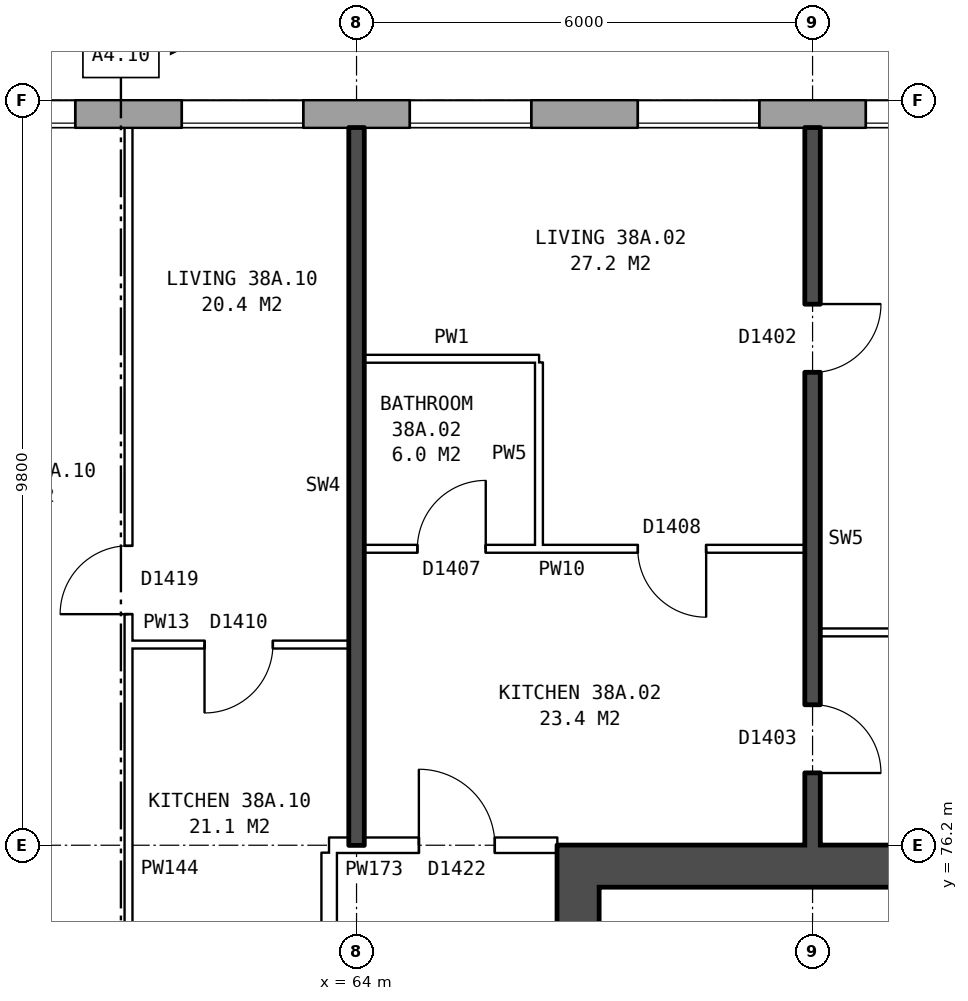
"""IFC4 building model, lengths in metres.
Left out: names, types, materials, properties, quantities, classifications, styles, units other than length and angle.
Written with IfcOpenShell. Run it as: python <this file> out.ifc"""

import sys

from ifc_helpers import new_model, si_unit, direction, frame, frame_2d, origin, place, context, subcontext, project, spatial, rectangle, extrude, element, fill, save


model = new_model("IFC4")
c1 = context("Model", 3, precision=1e-05, world=origin(), true_north=direction((0.0, 1.0)))
c2 = subcontext(c1, "Body", "Model", "MODEL_VIEW")
j1 = project(units=[si_unit("LENGTHUNIT", "METRE"), si_unit("PLANEANGLEUNIT", "RADIAN")], contexts=[c1])
p1 = place(None, origin())
s1 = spatial("IfcSite", under=j1, at=p1, CompositionType="ELEMENT")
p2 = place(p1, origin())
s2 = spatial("IfcBuilding", under=s1, at=p2, CompositionType="ELEMENT")
p3 = place(p2, frame((0.0, 0.0, 136.1)))
s3 = spatial("IfcBuildingStorey", under=s2, at=p3, CompositionType="ELEMENT", Elevation=136.1)
p4 = place(p3, frame((72.925, 85.82, 0.0), z_axis=(0.0, 0.0, 1.0), x_axis=(-1.0, 0.0, 0.0)))
e1 = element("IfcWall", 1, at=p4, inside=s3, PredefinedType="STANDARD", context=c2, shape_type="SweptSolid", body=[
    extrude(rectangle(XDim=43.101, YDim=0.36, at=frame_2d((21.55, 0.0))), origin(), (0.0, 0.0, 1.0), 2.85),
])
p5 = place(p4, frame((0.625, 0.0, 0.8)))
e2 = element("IfcOpeningElement", 2, at=p5, cuts=e1, PredefinedType="OPENING", context=c2, shape_type="SweptSolid", body=[
    extrude(rectangle(XDim=1.6, YDim=1.8, at=frame_2d((0.8, 0.9))), frame((0.0, 0.19, 0.0), z_axis=(0.0, -1.0, 0.0), x_axis=(1.0, 0.0, 0.0)), (0.0, 0.0, 1.0), 0.38),
])
p6 = place(p4, frame((3.625, 0.0, 0.8)))
e3 = element("IfcOpeningElement", 3, at=p6, cuts=e1, PredefinedType="OPENING", context=c2, shape_type="SweptSolid", body=[
    extrude(rectangle(XDim=1.6, YDim=1.8, at=frame_2d((0.8, 0.9))), frame((0.0, 0.19, 0.0), z_axis=(0.0, -1.0, 0.0), x_axis=(1.0, 0.0, 0.0)), (0.0, 0.0, 1.0), 0.38),
])
p7 = place(p4, frame((6.625, 0.0, 0.8)))
e4 = element("IfcOpeningElement", 4, at=p7, cuts=e1, PredefinedType="OPENING", context=c2, shape_type="SweptSolid", body=[
    extrude(rectangle(XDim=1.6, YDim=1.8, at=frame_2d((0.8, 0.9))), frame((0.0, 0.19, 0.0), z_axis=(0.0, -1.0, 0.0), x_axis=(1.0, 0.0, 0.0)), (0.0, 0.0, 1.0), 0.38),
])
p8 = place(p4, frame((9.625, 0.0, 0.8)))
e5 = element("IfcOpeningElement", 5, at=p8, cuts=e1, PredefinedType="OPENING", context=c2, shape_type="SweptSolid", body=[
    extrude(rectangle(XDim=1.6, YDim=1.8, at=frame_2d((0.8, 0.9))), frame((0.0, 0.19, 0.0), z_axis=(0.0, -1.0, 0.0), x_axis=(1.0, 0.0, 0.0)), (0.0, 0.0, 1.0), 0.38),
])
p9 = place(p4, frame((12.625, 0.0, 0.8)))
e6 = element("IfcOpeningElement", 6, at=p9, cuts=e1, PredefinedType="OPENING", context=c2, shape_type="SweptSolid", body=[
    extrude(rectangle(XDim=1.6, YDim=1.8, at=frame_2d((0.8, 0.9))), frame((0.0, 0.19, 0.0), z_axis=(0.0, -1.0, 0.0), x_axis=(1.0, 0.0, 0.0)), (0.0, 0.0, 1.0), 0.38),
])
p10 = place(p4, frame((15.125, 0.0, 1.35)))
e7 = element("IfcOpeningElement", 7, at=p10, cuts=e1, PredefinedType="OPENING", context=c2, shape_type="SweptSolid", body=[
    extrude(rectangle(XDim=1.0, YDim=1.2, at=frame_2d((0.5, 0.6))), frame((0.0, 0.19, 0.0), z_axis=(0.0, -1.0, 0.0), x_axis=(1.0, 0.0, 0.0)), (0.0, 0.0, 1.0), 0.38),
])
p11 = place(p4, frame((18.625, 0.0, 0.8)))
e8 = element("IfcOpeningElement", 8, at=p11, cuts=e1, PredefinedType="OPENING", context=c2, shape_type="SweptSolid", body=[
    extrude(rectangle(XDim=1.6, YDim=1.8, at=frame_2d((0.8, 0.9))), frame((0.0, 0.19, 0.0), z_axis=(0.0, -1.0, 0.0), x_axis=(1.0, 0.0, 0.0)), (0.0, 0.0, 1.0), 0.38),
])
p12 = place(p4, frame((21.625, 0.0, 0.8)))
e9 = element("IfcOpeningElement", 9, at=p12, cuts=e1, PredefinedType="OPENING", context=c2, shape_type="SweptSolid", body=[
    extrude(rectangle(XDim=1.6, YDim=1.8, at=frame_2d((0.8, 0.9))), frame((0.0, 0.19, 0.0), z_axis=(0.0, -1.0, 0.0), x_axis=(1.0, 0.0, 0.0)), (0.0, 0.0, 1.0), 0.38),
])
p13 = place(p4, frame((24.075, 0.0, 0.35)))
e10 = element("IfcOpeningElement", 10, at=p13, cuts=e1, PredefinedType="OPENING", context=c2, shape_type="SweptSolid", body=[
    extrude(rectangle(XDim=0.8, YDim=1.8, at=frame_2d((0.4, 0.9))), frame((0.0, 0.19, 0.0), z_axis=(0.0, -1.0, 0.0), x_axis=(1.0, 0.0, 0.0)), (0.0, 0.0, 1.0), 0.38),
])
p14 = place(p4, frame((27.625, 0.0, 0.8)))
e11 = element("IfcOpeningElement", 11, at=p14, cuts=e1, PredefinedType="OPENING", context=c2, shape_type="SweptSolid", body=[
    extrude(rectangle(XDim=1.6, YDim=1.8, at=frame_2d((0.8, 0.9))), frame((0.0, 0.19, 0.0), z_axis=(0.0, -1.0, 0.0), x_axis=(1.0, 0.0, 0.0)), (0.0, 0.0, 1.0), 0.38),
])
p15 = place(p4, frame((30.625, 0.0, 0.8)))
e12 = element("IfcOpeningElement", 12, at=p15, cuts=e1, PredefinedType="OPENING", context=c2, shape_type="SweptSolid", body=[
    extrude(rectangle(XDim=1.6, YDim=1.8, at=frame_2d((0.8, 0.9))), frame((0.0, 0.19, 0.0), z_axis=(0.0, -1.0, 0.0), x_axis=(1.0, 0.0, 0.0)), (0.0, 0.0, 1.0), 0.38),
])
p16 = place(p4, frame((33.625, 0.0, 0.8)))
e13 = element("IfcOpeningElement", 13, at=p16, cuts=e1, PredefinedType="OPENING", context=c2, shape_type="SweptSolid", body=[
    extrude(rectangle(XDim=1.6, YDim=1.8, at=frame_2d((0.8, 0.9))), frame((0.0, 0.19, 0.0), z_axis=(0.0, -1.0, 0.0), x_axis=(1.0, 0.0, 0.0)), (0.0, 0.0, 1.0), 0.38),
])
p17 = place(p4, frame((36.625, 0.0, 0.8)))
e14 = element("IfcOpeningElement", 14, at=p17, cuts=e1, PredefinedType="OPENING", context=c2, shape_type="SweptSolid", body=[
    extrude(rectangle(XDim=1.6, YDim=1.8, at=frame_2d((0.8, 0.9))), frame((0.0, 0.19, 0.0), z_axis=(0.0, -1.0, 0.0), x_axis=(1.0, 0.0, 0.0)), (0.0, 0.0, 1.0), 0.38),
])
p18 = place(p4, frame((39.625, 0.0, 0.8)))
e15 = element("IfcOpeningElement", 15, at=p18, cuts=e1, PredefinedType="OPENING", context=c2, shape_type="SweptSolid", body=[
    extrude(rectangle(XDim=1.6, YDim=1.8, at=frame_2d((0.8, 0.9))), frame((0.0, 0.19, 0.0), z_axis=(0.0, -1.0, 0.0), x_axis=(1.0, 0.0, 0.0)), (0.0, 0.0, 1.0), 0.38),
])
p19 = place(p4, frame((16.975, 0.0, 0.15)))
e16 = element("IfcOpeningElement", 16, at=p19, cuts=e1, PredefinedType="OPENING", context=c2, shape_type="SweptSolid", body=[
    extrude(rectangle(XDim=0.8, YDim=0.9, at=frame_2d((0.4, 0.45))), frame((0.0, 0.19, 0.0), z_axis=(0.0, -1.0, 0.0), x_axis=(1.0, 0.0, 0.0)), (0.0, 0.0, 1.0), 0.38),
])
p20 = place(p4, frame((25.175, 0.0, 0.25)))
e17 = element("IfcOpeningElement", 17, at=p20, cuts=e1, PredefinedType="OPENING", context=c2, shape_type="SweptSolid", body=[
    extrude(rectangle(XDim=0.8, YDim=0.9, at=frame_2d((0.4, 0.45))), frame((0.0, 0.19, 0.0), z_axis=(0.0, -1.0, 0.0), x_axis=(1.0, 0.0, 0.0)), (0.0, 0.0, 1.0), 0.38),
])
p21 = place(p3, frame((66.915, 63.8, 0.0), z_axis=(0.0, 0.0, 1.0), x_axis=(0.0, 1.0, 0.0)))
e18 = element("IfcWall", 18, at=p21, inside=s3, PredefinedType="SHEAR", context=c2, shape_type="SweptSolid", body=[
    extrude(rectangle(XDim=12.4, YDim=0.55, at=frame_2d((6.2, 0.0))), origin(), (0.0, 0.0, 1.0), 2.85),
])
p22 = place(p21, frame((1.325, 0.0, 0.0)))
e19 = element("IfcOpeningElement", 19, at=p22, cuts=e18, PredefinedType="OPENING", context=c2, shape_type="SweptSolid", body=[
    extrude(rectangle(XDim=1.1, YDim=2.1, at=frame_2d((0.55, 1.05))), frame((0.0, 0.285, 0.0), z_axis=(0.0, -1.0, 0.0), x_axis=(1.0, 0.0, 0.0)), (0.0, 0.0, 1.0), 0.57),
])
p23 = place(p21, frame((3.6, 0.0, 0.0)))
e20 = element("IfcOpeningElement", 20, at=p23, cuts=e18, PredefinedType="OPENING", context=c2, shape_type="SweptSolid", body=[
    extrude(rectangle(XDim=1.1, YDim=2.1, at=frame_2d((0.55, 1.05))), frame((0.0, 0.285, 0.0), z_axis=(0.0, -1.0, 0.0), x_axis=(1.0, 0.0, 0.0)), (0.0, 0.0, 1.0), 0.57),
])
p24 = place(p21, frame((5.8, 0.0, 0.0)))
e21 = element("IfcOpeningElement", 21, at=p24, cuts=e18, PredefinedType="OPENING", context=c2, shape_type="SweptSolid", body=[
    extrude(rectangle(XDim=1.1, YDim=2.1, at=frame_2d((0.55, 1.05))), frame((0.0, 0.285, 0.0), z_axis=(0.0, -1.0, 0.0), x_axis=(1.0, 0.0, 0.0)), (0.0, 0.0, 1.0), 0.57),
])
p25 = place(p21, frame((8.0, 0.0, 0.0)))
e22 = element("IfcOpeningElement", 22, at=p25, cuts=e18, PredefinedType="OPENING", context=c2, shape_type="SweptSolid", body=[
    extrude(rectangle(XDim=1.1, YDim=2.1, at=frame_2d((0.55, 1.05))), frame((0.0, 0.285, 0.0), z_axis=(0.0, -1.0, 0.0), x_axis=(1.0, 0.0, 0.0)), (0.0, 0.0, 1.0), 0.57),
])
p26 = place(p21, frame((9.9, 0.0, 0.0)))
e23 = element("IfcOpeningElement", 23, at=p26, cuts=e18, PredefinedType="OPENING", context=c2, shape_type="SweptSolid", body=[
    extrude(rectangle(XDim=1.1, YDim=2.1, at=frame_2d((0.55, 1.05))), frame((0.0, 0.285, 0.0), z_axis=(0.0, -1.0, 0.0), x_axis=(1.0, 0.0, 0.0)), (0.0, 0.0, 1.0), 0.57),
])
p27 = place(p3, frame((67.19, 75.925, 0.0), z_axis=(0.0, 0.0, 1.0), x_axis=(1.0, 0.0, 0.0)))
e24 = element("IfcWall", 24, at=p27, inside=s3, PredefinedType="SHEAR", context=c2, shape_type="SweptSolid", body=[
    extrude(rectangle(XDim=7.9, YDim=0.55, at=frame_2d((3.95, 0.0))), origin(), (0.0, 0.0, 1.0), 2.85),
])
p28 = place(p3, frame((63.64, 63.9, 0.0), z_axis=(0.0, 0.0, 1.0), x_axis=(0.0, 1.0, 0.0)))
e25 = element("IfcWall", 25, at=p28, inside=s3, PredefinedType="PARTITIONING", context=c2, shape_type="SweptSolid", body=[
    extrude(rectangle(XDim=12.2, YDim=0.2, at=frame_2d((6.1, 0.0))), origin(), (0.0, 0.0, 1.0), 2.85),
])
p29 = place(p28, frame((5.1, 0.0, 0.0)))
e26 = element("IfcOpeningElement", 26, at=p29, cuts=e25, PredefinedType="OPENING", context=c2, shape_type="SweptSolid", body=[
    extrude(rectangle(XDim=2.0, YDim=2.1, at=frame_2d((1.0, 1.05))), frame((0.0, 0.11, 0.0), z_axis=(0.0, -1.0, 0.0), x_axis=(1.0, 0.0, 0.0)), (0.0, 0.0, 1.0), 0.22),
])
p30 = place(p3, frame((63.64, 76.2, 0.0), z_axis=(0.0, 0.0, 1.0), x_axis=(1.0, 0.0, 0.0)))
e27 = element("IfcWall", 27, at=p30, inside=s3, PredefinedType="PARTITIONING", context=c2, shape_type="SweptSolid", body=[
    extrude(rectangle(XDim=3.0, YDim=0.2, at=frame_2d((1.5, 0.0))), origin(), (0.0, 0.0, 1.0), 2.85),
])
p31 = place(p30, frame((1.18, 0.0, 0.0)))
e28 = element("IfcOpeningElement", 28, at=p31, cuts=e27, PredefinedType="OPENING", context=c2, shape_type="SweptSolid", body=[
    extrude(rectangle(XDim=1.0, YDim=2.1, at=frame_2d((0.5, 1.05))), frame((0.0, 0.11, 0.0), z_axis=(0.0, -1.0, 0.0), x_axis=(1.0, 0.0, 0.0)), (0.0, 0.0, 1.0), 0.22),
])
p32 = place(p3, frame((61.0, 78.84, 0.0), z_axis=(0.0, 0.0, 1.0), x_axis=(1.0, 0.0, 0.0)))
e29 = element("IfcWall", 29, at=p32, inside=s3, PredefinedType="PARTITIONING", context=c2, shape_type="SweptSolid", body=[
    extrude(rectangle(XDim=2.9, YDim=0.1, at=frame_2d((1.45, 0.0))), origin(), (0.0, 0.0, 1.0), 2.85),
])
p33 = place(p32, frame((1.0, 0.0, 0.0)))
e30 = element("IfcOpeningElement", 30, at=p33, cuts=e29, PredefinedType="OPENING", context=c2, shape_type="SweptSolid", body=[
    extrude(rectangle(XDim=0.9, YDim=2.1, at=frame_2d((0.45, 1.05))), frame((0.0, 0.06, 0.0), z_axis=(0.0, -1.0, 0.0), x_axis=(1.0, 0.0, 0.0)), (0.0, 0.0, 1.0), 0.12),
])
p34 = place(p3, frame((70.1, 79.0, 0.0), z_axis=(0.0, 0.0, 1.0), x_axis=(1.0, 0.0, 0.0)))
e31 = element("IfcWall", 31, at=p34, inside=s3, PredefinedType="PARTITIONING", context=c2, shape_type="SweptSolid", body=[
    extrude(rectangle(XDim=5.54, YDim=0.1, at=frame_2d((2.77, 0.0))), origin(), (0.0, 0.0, 1.0), 2.85),
])
p35 = place(p3, frame((64.1, 80.1, 0.0), z_axis=(0.0, 0.0, 1.0), x_axis=(1.0, 0.0, 0.0)))
e32 = element("IfcWall", 32, at=p35, inside=s3, PredefinedType="PARTITIONING", context=c2, shape_type="SweptSolid", body=[
    extrude(rectangle(XDim=5.8, YDim=0.1, at=frame_2d((2.9, 0.0))), origin(), (0.0, 0.0, 1.0), 2.85),
])
p36 = place(p35, frame((3.6, 0.0, 0.0)))
e33 = element("IfcOpeningElement", 33, at=p36, cuts=e32, PredefinedType="OPENING", context=c2, shape_type="SweptSolid", body=[
    extrude(rectangle(XDim=0.9, YDim=2.1, at=frame_2d((0.45, 1.05))), frame((0.0, 0.06, 0.0), z_axis=(0.0, -1.0, 0.0), x_axis=(1.0, 0.0, 0.0)), (0.0, 0.0, 1.0), 0.12),
])
p37 = place(p35, frame((0.7, 0.0, 0.0)))
e34 = element("IfcOpeningElement", 34, at=p37, cuts=e32, PredefinedType="OPENING", context=c2, shape_type="SweptSolid", body=[
    extrude(rectangle(XDim=0.9, YDim=2.1, at=frame_2d((0.45, 1.05))), frame((0.0, 0.06, 0.0), z_axis=(0.0, -1.0, 0.0), x_axis=(1.0, 0.0, 0.0)), (0.0, 0.0, 1.0), 0.12),
])
p38 = place(p3, frame((64.1, 82.6, 0.0), z_axis=(0.0, 0.0, 1.0), x_axis=(1.0, 0.0, 0.0)))
e35 = element("IfcWall", 35, at=p38, inside=s3, PredefinedType="PARTITIONING", context=c2, shape_type="SweptSolid", body=[
    extrude(rectangle(XDim=2.3, YDim=0.1, at=frame_2d((1.15, 0.0))), origin(), (0.0, 0.0, 1.0), 2.85),
])
p39 = place(p3, frame((61.0, 71.3, 0.0), z_axis=(0.0, 0.0, 1.0), x_axis=(0.0, 1.0, 0.0)))
e36 = element("IfcWall", 36, at=p39, inside=s3, PredefinedType="PARTITIONING", context=c2, shape_type="SweptSolid", body=[
    extrude(rectangle(XDim=14.34, YDim=0.1, at=frame_2d((7.17, 0.0))), origin(), (0.0, 0.0, 1.0), 2.85),
])
p40 = place(p39, frame((7.94, 0.0, 0.0)))
e37 = element("IfcOpeningElement", 37, at=p40, cuts=e36, PredefinedType="OPENING", context=c2, shape_type="SweptSolid", body=[
    extrude(rectangle(XDim=0.9, YDim=2.1, at=frame_2d((0.45, 1.05))), frame((0.0, 0.06, 0.0), z_axis=(0.0, -1.0, 0.0), x_axis=(1.0, 0.0, 0.0)), (0.0, 0.0, 1.0), 0.12),
])
p41 = place(p39, frame((0.9, 0.0, 0.0)))
e38 = element("IfcOpeningElement", 38, at=p41, cuts=e36, PredefinedType="OPENING", context=c2, shape_type="SweptSolid", body=[
    extrude(rectangle(XDim=0.9, YDim=2.1, at=frame_2d((0.45, 1.05))), frame((0.0, 0.06, 0.0), z_axis=(0.0, -1.0, 0.0), x_axis=(1.0, 0.0, 0.0)), (0.0, 0.0, 1.0), 0.12),
])
p42 = place(p3, frame((64.0, 76.2, 0.0), z_axis=(0.0, 0.0, 1.0), x_axis=(0.0, 1.0, 0.0)))
e39 = element("IfcWall", 39, at=p42, inside=s3, PredefinedType="SOLIDWALL", context=c2, shape_type="SweptSolid", body=[
    extrude(rectangle(XDim=9.44, YDim=0.2, at=frame_2d((4.72, 0.0))), origin(), (0.0, 0.0, 1.0), 2.85),
])
p43 = place(p3, frame((66.4, 80.15, 0.0), z_axis=(0.0, 0.0, 1.0), x_axis=(0.0, 1.0, 0.0)))
e40 = element("IfcWall", 40, at=p43, inside=s3, PredefinedType="PARTITIONING", context=c2, shape_type="SweptSolid", body=[
    extrude(rectangle(XDim=2.4, YDim=0.1, at=frame_2d((1.2, 0.0))), origin(), (0.0, 0.0, 1.0), 2.85),
])
p44 = place(p3, frame((70.0, 76.2, 0.0), z_axis=(0.0, 0.0, 1.0), x_axis=(0.0, 1.0, 0.0)))
e41 = element("IfcWall", 41, at=p44, inside=s3, PredefinedType="SOLIDWALL", context=c2, shape_type="SweptSolid", body=[
    extrude(rectangle(XDim=9.44, YDim=0.2, at=frame_2d((4.72, 0.0))), origin(), (0.0, 0.0, 1.0), 2.85),
])
p45 = place(p44, frame((6.22, 0.0, 0.0)))
e42 = element("IfcOpeningElement", 42, at=p45, cuts=e41, PredefinedType="OPENING", context=c2, shape_type="SweptSolid", body=[
    extrude(rectangle(XDim=0.9, YDim=2.1, at=frame_2d((0.45, 1.05))), frame((0.0, 0.11, 0.0), z_axis=(0.0, -1.0, 0.0), x_axis=(1.0, 0.0, 0.0)), (0.0, 0.0, 1.0), 0.22),
])
p46 = place(p44, frame((0.95, 0.0, 0.0)))
e43 = element("IfcOpeningElement", 43, at=p46, cuts=e41, PredefinedType="OPENING", context=c2, shape_type="SweptSolid", body=[
    extrude(rectangle(XDim=0.9, YDim=2.1, at=frame_2d((0.45, 1.05))), frame((0.0, 0.11, 0.0), z_axis=(0.0, -1.0, 0.0), x_axis=(1.0, 0.0, 0.0)), (0.0, 0.0, 1.0), 0.22),
])
p47 = place(p5, origin())
e44 = element("IfcWindow", 44, at=p47, inside=s3, PartitioningType="SINGLE_PANEL", PredefinedType="WINDOW", context=c2, shape_type="SweptSolid", body=[
    extrude(rectangle(XDim=1.6, YDim=1.8, at=frame_2d((0.8, 0.9))), frame((0.0, 0.15, 0.0), z_axis=(0.0, -1.0, 0.0), x_axis=(1.0, 0.0, 0.0)), (0.0, 0.0, 1.0), 0.06),
])
fill(e2, e44)
p48 = place(p6, origin())
e45 = element("IfcWindow", 45, at=p48, inside=s3, PartitioningType="SINGLE_PANEL", PredefinedType="WINDOW", context=c2, shape_type="SweptSolid", body=[
    extrude(rectangle(XDim=1.6, YDim=1.8, at=frame_2d((0.8, 0.9))), frame((0.0, 0.15, 0.0), z_axis=(0.0, -1.0, 0.0), x_axis=(1.0, 0.0, 0.0)), (0.0, 0.0, 1.0), 0.06),
])
fill(e3, e45)
p49 = place(p7, origin())
e46 = element("IfcWindow", 46, at=p49, inside=s3, PartitioningType="SINGLE_PANEL", PredefinedType="WINDOW", context=c2, shape_type="SweptSolid", body=[
    extrude(rectangle(XDim=1.6, YDim=1.8, at=frame_2d((0.8, 0.9))), frame((0.0, 0.15, 0.0), z_axis=(0.0, -1.0, 0.0), x_axis=(1.0, 0.0, 0.0)), (0.0, 0.0, 1.0), 0.06),
])
fill(e4, e46)
p50 = place(p8, origin())
e47 = element("IfcWindow", 47, at=p50, inside=s3, PartitioningType="SINGLE_PANEL", PredefinedType="WINDOW", context=c2, shape_type="SweptSolid", body=[
    extrude(rectangle(XDim=1.6, YDim=1.8, at=frame_2d((0.8, 0.9))), frame((0.0, 0.15, 0.0), z_axis=(0.0, -1.0, 0.0), x_axis=(1.0, 0.0, 0.0)), (0.0, 0.0, 1.0), 0.06),
])
fill(e5, e47)
p51 = place(p9, origin())
e48 = element("IfcWindow", 48, at=p51, inside=s3, PartitioningType="SINGLE_PANEL", PredefinedType="WINDOW", context=c2, shape_type="SweptSolid", body=[
    extrude(rectangle(XDim=1.6, YDim=1.8, at=frame_2d((0.8, 0.9))), frame((0.0, 0.15, 0.0), z_axis=(0.0, -1.0, 0.0), x_axis=(1.0, 0.0, 0.0)), (0.0, 0.0, 1.0), 0.06),
])
fill(e6, e48)
p52 = place(p45, frame((0.9, 0.0, 0.0), z_axis=(0.0, 0.0, 1.0), x_axis=(-1.0, 0.0, 0.0)))
e49 = element("IfcDoor", 49, at=p52, inside=s3, OperationType="SINGLE_SWING_LEFT", PredefinedType="DOOR", context=c2, shape_type="SweptSolid", body=[
    extrude(rectangle(XDim=0.9, YDim=2.1, at=frame_2d((0.45, 1.05))), frame((0.0, 0.025, 0.0), z_axis=(0.0, -1.0, 0.0), x_axis=(1.0, 0.0, 0.0)), (0.0, 0.0, 1.0), 0.05),
])
fill(e42, e49)
p53 = place(p46, frame((0.9, 0.0, 0.0), z_axis=(0.0, 0.0, 1.0), x_axis=(-1.0, 0.0, 0.0)))
e50 = element("IfcDoor", 50, at=p53, inside=s3, OperationType="SINGLE_SWING_RIGHT", PredefinedType="DOOR", context=c2, shape_type="SweptSolid", body=[
    extrude(rectangle(XDim=0.9, YDim=2.1, at=frame_2d((0.45, 1.05))), frame((0.0, 0.025, 0.0), z_axis=(0.0, -1.0, 0.0), x_axis=(1.0, 0.0, 0.0)), (0.0, 0.0, 1.0), 0.05),
])
fill(e43, e50)
p54 = place(p31, origin())
e51 = element("IfcDoor", 51, at=p54, inside=s3, OperationType="SINGLE_SWING_LEFT", PredefinedType="DOOR", context=c2, shape_type="SweptSolid", body=[
    extrude(rectangle(XDim=1.0, YDim=2.1, at=frame_2d((0.5, 1.05))), frame((0.0, 0.025, 0.0), z_axis=(0.0, -1.0, 0.0), x_axis=(1.0, 0.0, 0.0)), (0.0, 0.0, 1.0), 0.05),
])
fill(e28, e51)
p55 = place(p36, frame((0.9, 0.0, 0.0), z_axis=(0.0, 0.0, 1.0), x_axis=(-1.0, 0.0, 0.0)))
e52 = element("IfcDoor", 52, at=p55, inside=s3, OperationType="SINGLE_SWING_LEFT", PredefinedType="DOOR", context=c2, shape_type="SweptSolid", body=[
    extrude(rectangle(XDim=0.9, YDim=2.1, at=frame_2d((0.45, 1.05))), frame((0.0, 0.025, 0.0), z_axis=(0.0, -1.0, 0.0), x_axis=(1.0, 0.0, 0.0)), (0.0, 0.0, 1.0), 0.05),
])
fill(e33, e52)
p56 = place(p37, origin())
e53 = element("IfcDoor", 53, at=p56, inside=s3, OperationType="SINGLE_SWING_RIGHT", PredefinedType="DOOR", context=c2, shape_type="SweptSolid", body=[
    extrude(rectangle(XDim=0.9, YDim=2.1, at=frame_2d((0.45, 1.05))), frame((0.0, 0.025, 0.0), z_axis=(0.0, -1.0, 0.0), x_axis=(1.0, 0.0, 0.0)), (0.0, 0.0, 1.0), 0.05),
])
fill(e34, e53)
p57 = place(p40, origin())
e54 = element("IfcDoor", 54, at=p57, inside=s3, OperationType="SINGLE_SWING_LEFT", PredefinedType="DOOR", context=c2, shape_type="SweptSolid", body=[
    extrude(rectangle(XDim=0.9, YDim=2.1, at=frame_2d((0.45, 1.05))), frame((0.0, 0.025, 0.0), z_axis=(0.0, -1.0, 0.0), x_axis=(1.0, 0.0, 0.0)), (0.0, 0.0, 1.0), 0.05),
])
fill(e37, e54)
p58 = place(p33, frame((0.9, 0.0, 0.0), z_axis=(0.0, 0.0, 1.0), x_axis=(-1.0, 0.0, 0.0)))
e55 = element("IfcDoor", 55, at=p58, inside=s3, OperationType="SINGLE_SWING_RIGHT", PredefinedType="DOOR", context=c2, shape_type="SweptSolid", body=[
    extrude(rectangle(XDim=0.9, YDim=2.1, at=frame_2d((0.45, 1.05))), frame((0.0, 0.025, 0.0), z_axis=(0.0, -1.0, 0.0), x_axis=(1.0, 0.0, 0.0)), (0.0, 0.0, 1.0), 0.05),
])
fill(e30, e55)
save(model, sys.argv[1])
